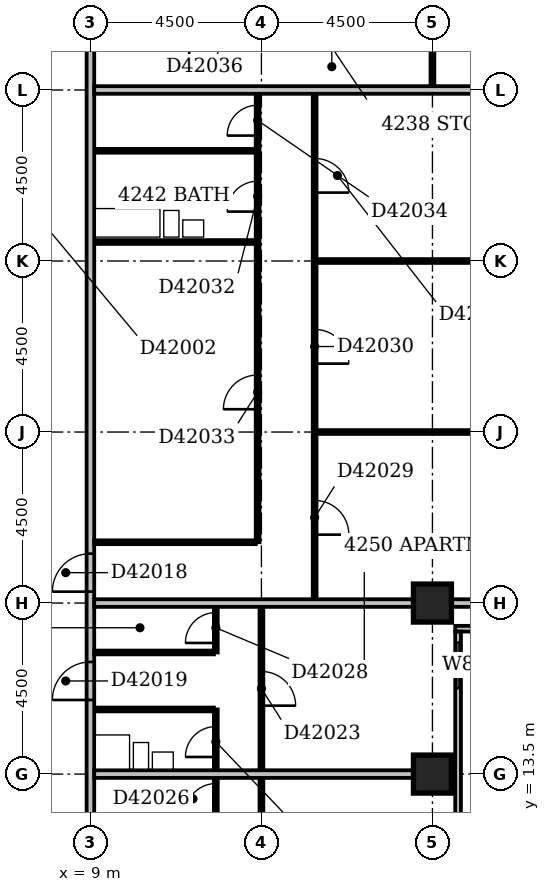
"""IFC4 building model, lengths in metres.
Left out: names, types, materials, properties, quantities, classifications, styles, units other than length and angle.
Written with IfcOpenShell. Run it as: python <this file> out.ifc"""

import sys

from ifc_helpers import new_model, si_unit, direction, frame, frame_2d, origin, origin_2d, place, context, subcontext, project, spatial, rectangle, extrude, element, fill, save


model = new_model("IFC4")
c1 = context("Model", 3, precision=1e-05, world=origin(), true_north=direction((0.0, 1.0)))
c2 = subcontext(c1, "Body", "Model", "MODEL_VIEW")
j1 = project(units=[si_unit("LENGTHUNIT", "METRE"), si_unit("PLANEANGLEUNIT", "RADIAN")], contexts=[c1])
p1 = place(None, origin())
s1 = spatial("IfcSite", under=j1, at=p1, CompositionType="ELEMENT")
p2 = place(p1, origin())
s2 = spatial("IfcBuilding", under=s1, at=p2, CompositionType="ELEMENT")
p3 = place(p2, frame((0.0, 0.0, 166.4)))
s3 = spatial("IfcBuildingStorey", under=s2, at=p3, CompositionType="ELEMENT", Elevation=166.4)
for number, where, z_axis, x_axis in (
    (1, (18.0, 13.5, -0.3), (0.0, 0.0, 1.0), (1.0, 0.0, 0.0)),
    (2, (18.0, 18.0, -0.3), (0.0, 0.0, 1.0), (1.0, 0.0, 0.0)),
):
    element("IfcColumn", number, at=place(p3, frame(where, z_axis=z_axis, x_axis=x_axis)), inside=s3, PredefinedType="COLUMN", context=c2, shape_type="SweptSolid", body=[
        extrude(rectangle(XDim=1.0, YDim=1.0, at=origin_2d()), origin(), (0.0, 0.0, 1.0), 3.6),
    ])
p4 = place(p3, frame((18.675, 8.4, 0.0), z_axis=(0.0, 0.0, 1.0), x_axis=(0.0, 1.0, 0.0)))
e3 = element("IfcWall", 3, at=p4, inside=s3, PredefinedType="STANDARD", context=c2, shape_type="SweptSolid", body=[
    extrude(rectangle(XDim=8.85, YDim=0.15, at=frame_2d((4.425, 0.0))), origin(), (0.0, 0.0, 1.0), 2.7),
])
p5 = place(p4, frame((1.65, 0.0, 0.6)))
e4 = element("IfcOpeningElement", 4, at=p5, cuts=e3, PredefinedType="OPENING", context=c2, shape_type="SweptSolid", body=[
    extrude(rectangle(XDim=2.4, YDim=1.8, at=frame_2d((1.2, 0.9))), frame((0.0, 0.087, 0.0), z_axis=(0.0, -1.0, 0.0), x_axis=(1.0, 0.0, 0.0)), (0.0, 0.0, 1.0), 0.174),
])
p6 = place(p4, frame((7.36, 0.0, 0.6)))
e5 = element("IfcOpeningElement", 5, at=p6, cuts=e3, PredefinedType="OPENING", context=c2, shape_type="SweptSolid", body=[
    extrude(rectangle(XDim=1.2, YDim=1.8, at=frame_2d((0.6, 0.9))), frame((0.0, 0.087, 0.0), z_axis=(0.0, -1.0, 0.0), x_axis=(1.0, 0.0, 0.0)), (0.0, 0.0, 1.0), 0.174),
])
p7 = place(p3, frame((18.6, 17.325, 0.0), z_axis=(0.0, 0.0, 1.0), x_axis=(1.0, 0.0, 0.0)))
e6 = element("IfcWall", 6, at=p7, inside=s3, PredefinedType="STANDARD", context=c2, shape_type="SweptSolid", body=[
    extrude(rectangle(XDim=4.65, YDim=0.15, at=frame_2d((2.325, 0.0))), origin(), (0.0, 0.0, 1.0), 2.7),
])
p8 = place(p7, frame((0.45, 0.0, 0.6)))
e7 = element("IfcOpeningElement", 7, at=p8, cuts=e6, PredefinedType="OPENING", context=c2, shape_type="SweptSolid", body=[
    extrude(rectangle(XDim=2.4, YDim=1.8, at=frame_2d((1.2, 0.9))), frame((0.0, 0.087, 0.0), z_axis=(0.0, -1.0, 0.0), x_axis=(1.0, 0.0, 0.0)), (0.0, 0.0, 1.0), 0.174),
])
p9 = place(p3, frame((9.0, 5.0, 0.0), z_axis=(0.0, 0.0, 1.0), x_axis=(0.0, 1.0, 0.0)))
e8 = element("IfcWall", 8, at=p9, inside=s3, PredefinedType="PARTITIONING", context=c2, shape_type="SweptSolid", body=[
    extrude(rectangle(XDim=27.75, YDim=0.2, at=frame_2d((13.875, 0.0))), origin(), (0.0, 0.0, 1.0), 3.3),
])
p10 = place(p9, frame((13.3, 0.0, 0.0)))
e9 = element("IfcOpeningElement", 9, at=p10, cuts=e8, PredefinedType="OPENING", context=c2, shape_type="SweptSolid", body=[
    extrude(rectangle(XDim=1.0, YDim=2.1, at=frame_2d((0.5, 1.05))), frame((0.0, 0.112, 0.0), z_axis=(0.0, -1.0, 0.0), x_axis=(1.0, 0.0, 0.0)), (0.0, 0.0, 1.0), 0.224),
])
p11 = place(p9, frame((10.45, 0.0, 0.0)))
e10 = element("IfcOpeningElement", 10, at=p11, cuts=e8, PredefinedType="OPENING", context=c2, shape_type="SweptSolid", body=[
    extrude(rectangle(XDim=1.0, YDim=2.1, at=frame_2d((0.5, 1.05))), frame((0.0, 0.112, 0.0), z_axis=(0.0, -1.0, 0.0), x_axis=(1.0, 0.0, 0.0)), (0.0, 0.0, 1.0), 0.224),
])
p12 = place(p9, frame((5.95, 0.0, 0.0)))
e11 = element("IfcOpeningElement", 11, at=p12, cuts=e8, PredefinedType="OPENING", context=c2, shape_type="SweptSolid", body=[
    extrude(rectangle(XDim=1.0, YDim=2.1, at=frame_2d((0.5, 1.05))), frame((0.0, 0.112, 0.0), z_axis=(0.0, -1.0, 0.0), x_axis=(1.0, 0.0, 0.0)), (0.0, 0.0, 1.0), 0.224),
])
p13 = place(p9, frame((1.5, 0.0, 0.0)))
e12 = element("IfcOpeningElement", 12, at=p13, cuts=e8, PredefinedType="OPENING", context=c2, shape_type="SweptSolid", body=[
    extrude(rectangle(XDim=0.9, YDim=2.1, at=frame_2d((0.45, 1.05))), frame((0.0, 0.112, 0.0), z_axis=(0.0, -1.0, 0.0), x_axis=(1.0, 0.0, 0.0)), (0.0, 0.0, 1.0), 0.224),
])
p14 = place(p3, frame((13.5, 9.5, 0.0), z_axis=(0.0, 0.0, 1.0), x_axis=(0.0, 1.0, 0.0)))
e13 = element("IfcWall", 13, at=p14, inside=s3, PredefinedType="PARTITIONING", context=c2, shape_type="SweptSolid", body=[
    extrude(rectangle(XDim=8.4, YDim=0.1, at=frame_2d((4.2, 0.0))), origin(), (0.0, 0.0, 1.0), 3.3),
])
p15 = place(p14, frame((5.8, 0.0, 0.0)))
e14 = element("IfcOpeningElement", 14, at=p15, cuts=e13, PredefinedType="OPENING", context=c2, shape_type="SweptSolid", body=[
    extrude(rectangle(XDim=0.9, YDim=2.1, at=frame_2d((0.45, 1.05))), frame((0.0, 0.062, 0.0), z_axis=(0.0, -1.0, 0.0), x_axis=(1.0, 0.0, 0.0)), (0.0, 0.0, 1.0), 0.124),
])
p16 = place(p14, frame((1.3, 0.0, 0.0)))
e15 = element("IfcOpeningElement", 15, at=p16, cuts=e13, PredefinedType="OPENING", context=c2, shape_type="SweptSolid", body=[
    extrude(rectangle(XDim=0.9, YDim=2.1, at=frame_2d((0.45, 1.05))), frame((0.0, 0.062, 0.0), z_axis=(0.0, -1.0, 0.0), x_axis=(1.0, 0.0, 0.0)), (0.0, 0.0, 1.0), 0.124),
])
p17 = place(p3, frame((12.3, 12.2, 0.0), z_axis=(0.0, 0.0, 1.0), x_axis=(0.0, 1.0, 0.0)))
e16 = element("IfcWall", 16, at=p17, inside=s3, PredefinedType="PARTITIONING", context=c2, shape_type="SweptSolid", body=[
    extrude(rectangle(XDim=3.0, YDim=0.1, at=frame_2d((1.5, 0.0))), origin(), (0.0, 0.0, 1.0), 3.3),
])
p18 = place(p17, frame((1.75, 0.0, 0.0)))
e17 = element("IfcOpeningElement", 17, at=p18, cuts=e16, PredefinedType="OPENING", context=c2, shape_type="SweptSolid", body=[
    extrude(rectangle(XDim=0.8, YDim=2.1, at=frame_2d((0.4, 1.05))), frame((0.0, 0.062, 0.0), z_axis=(0.0, -1.0, 0.0), x_axis=(1.0, 0.0, 0.0)), (0.0, 0.0, 1.0), 0.124),
])
p19 = place(p17, frame((0.25, 0.0, 0.0)))
e18 = element("IfcOpeningElement", 18, at=p19, cuts=e16, PredefinedType="OPENING", context=c2, shape_type="SweptSolid", body=[
    extrude(rectangle(XDim=0.8, YDim=2.1, at=frame_2d((0.4, 1.05))), frame((0.0, 0.062, 0.0), z_axis=(0.0, -1.0, 0.0), x_axis=(1.0, 0.0, 0.0)), (0.0, 0.0, 1.0), 0.124),
])
p20 = place(p3, frame((9.1, 13.5, 0.0), z_axis=(0.0, 0.0, 1.0), x_axis=(1.0, 0.0, 0.0)))
e19 = element("IfcWall", 19, at=p20, inside=s3, PredefinedType="PARTITIONING", context=c2, shape_type="SweptSolid", body=[
    extrude(rectangle(XDim=8.4, YDim=0.2, at=frame_2d((4.2, 0.0))), origin(), (0.0, 0.0, 1.0), 3.3),
])
p21 = place(p3, frame((9.1, 15.2, 0.0), z_axis=(0.0, 0.0, 1.0), x_axis=(1.0, 0.0, 0.0)))
e20 = element("IfcWall", 20, at=p21, inside=s3, PredefinedType="PLUMBINGWALL", context=c2, shape_type="SweptSolid", body=[
    extrude(rectangle(XDim=3.15, YDim=0.1, at=frame_2d((1.575, 0.0))), origin(), (0.0, 0.0, 1.0), 3.3),
])
p22 = place(p3, frame((9.1, 16.7, 0.0), z_axis=(0.0, 0.0, 1.0), x_axis=(1.0, 0.0, 0.0)))
e21 = element("IfcWall", 21, at=p22, inside=s3, PredefinedType="PARTITIONING", context=c2, shape_type="SweptSolid", body=[
    extrude(rectangle(XDim=3.15, YDim=0.1, at=frame_2d((1.575, 0.0))), origin(), (0.0, 0.0, 1.0), 3.3),
])
p23 = place(p3, frame((12.3, 16.7, 0.0), z_axis=(0.0, 0.0, 1.0), x_axis=(0.0, 1.0, 0.0)))
e22 = element("IfcWall", 22, at=p23, inside=s3, PredefinedType="PARTITIONING", context=c2, shape_type="SweptSolid", body=[
    extrude(rectangle(XDim=1.2, YDim=0.1, at=frame_2d((0.6, 0.0))), origin(), (0.0, 0.0, 1.0), 3.3),
])
p24 = place(p23, frame((0.25, 0.0, 0.0)))
e23 = element("IfcOpeningElement", 23, at=p24, cuts=e22, PredefinedType="OPENING", context=c2, shape_type="SweptSolid", body=[
    extrude(rectangle(XDim=0.8, YDim=2.1, at=frame_2d((0.4, 1.05))), frame((0.0, 0.062, 0.0), z_axis=(0.0, -1.0, 0.0), x_axis=(1.0, 0.0, 0.0)), (0.0, 0.0, 1.0), 0.124),
])
p25 = place(p3, frame((9.1, 18.0, 0.0), z_axis=(0.0, 0.0, 1.0), x_axis=(1.0, 0.0, 0.0)))
e24 = element("IfcWall", 24, at=p25, inside=s3, PredefinedType="PARTITIONING", context=c2, shape_type="SweptSolid", body=[
    extrude(rectangle(XDim=8.4, YDim=0.2, at=frame_2d((4.2, 0.0))), origin(), (0.0, 0.0, 1.0), 2.6),
])
p26 = place(p3, frame((18.5, 18.0, 0.0), z_axis=(0.0, 0.0, 1.0), x_axis=(1.0, 0.0, 0.0)))
e25 = element("IfcWall", 25, at=p26, inside=s3, PredefinedType="PARTITIONING", context=c2, shape_type="SweptSolid", body=[
    extrude(rectangle(XDim=3.5, YDim=0.2, at=frame_2d((1.75, 0.0))), origin(), (0.0, 0.0, 1.0), 2.7),
])
p27 = place(p3, frame((14.9, 18.1, 0.0), z_axis=(0.0, 0.0, 1.0), x_axis=(0.0, 1.0, 0.0)))
e26 = element("IfcWall", 26, at=p27, inside=s3, PredefinedType="PARTITIONING", context=c2, shape_type="SweptSolid", body=[
    extrude(rectangle(XDim=13.3, YDim=0.1, at=frame_2d((6.65, 0.0))), origin(), (0.0, 0.0, 1.0), 3.3),
])
p28 = place(p27, frame((1.7, 0.0, 0.0)))
e27 = element("IfcOpeningElement", 27, at=p28, cuts=e26, PredefinedType="OPENING", context=c2, shape_type="SweptSolid", body=[
    extrude(rectangle(XDim=0.9, YDim=2.1, at=frame_2d((0.45, 1.05))), frame((0.0, 0.062, 0.0), z_axis=(0.0, -1.0, 0.0), x_axis=(1.0, 0.0, 0.0)), (0.0, 0.0, 1.0), 0.124),
])
p29 = place(p27, frame((6.2, 0.0, 0.0)))
e28 = element("IfcOpeningElement", 28, at=p29, cuts=e26, PredefinedType="OPENING", context=c2, shape_type="SweptSolid", body=[
    extrude(rectangle(XDim=0.9, YDim=2.1, at=frame_2d((0.45, 1.05))), frame((0.0, 0.062, 0.0), z_axis=(0.0, -1.0, 0.0), x_axis=(1.0, 0.0, 0.0)), (0.0, 0.0, 1.0), 0.124),
])
p30 = place(p27, frame((10.7, 0.0, 0.0)))
e29 = element("IfcOpeningElement", 29, at=p30, cuts=e26, PredefinedType="OPENING", context=c2, shape_type="SweptSolid", body=[
    extrude(rectangle(XDim=0.9, YDim=2.1, at=frame_2d((0.45, 1.05))), frame((0.0, 0.062, 0.0), z_axis=(0.0, -1.0, 0.0), x_axis=(1.0, 0.0, 0.0)), (0.0, 0.0, 1.0), 0.124),
])
p31 = place(p3, frame((9.1, 19.6, 0.0), z_axis=(0.0, 0.0, 1.0), x_axis=(1.0, 0.0, 0.0)))
e30 = element("IfcWall", 30, at=p31, inside=s3, PredefinedType="PARTITIONING", context=c2, shape_type="SweptSolid", body=[
    extrude(rectangle(XDim=4.25, YDim=0.1, at=frame_2d((2.125, 0.0))), origin(), (0.0, 0.0, 1.0), 3.3),
])
p32 = place(p3, frame((13.4, 19.6, 0.0), z_axis=(0.0, 0.0, 1.0), x_axis=(0.0, 1.0, 0.0)))
e31 = element("IfcWall", 31, at=p32, inside=s3, PredefinedType="PARTITIONING", context=c2, shape_type="SweptSolid", body=[
    extrude(rectangle(XDim=11.8, YDim=0.1, at=frame_2d((5.9, 0.0))), origin(), (0.0, 0.0, 1.0), 3.3),
])
p33 = place(p32, frame((8.7, 0.0, 0.0)))
e32 = element("IfcOpeningElement", 32, at=p33, cuts=e31, PredefinedType="OPENING", context=c2, shape_type="SweptSolid", body=[
    extrude(rectangle(XDim=0.8, YDim=2.1, at=frame_2d((0.4, 1.05))), frame((0.0, 0.062, 0.0), z_axis=(0.0, -1.0, 0.0), x_axis=(1.0, 0.0, 0.0)), (0.0, 0.0, 1.0), 0.124),
])
p34 = place(p32, frame((3.5, 0.0, 0.0)))
e33 = element("IfcOpeningElement", 33, at=p34, cuts=e31, PredefinedType="OPENING", context=c2, shape_type="SweptSolid", body=[
    extrude(rectangle(XDim=0.9, YDim=2.1, at=frame_2d((0.45, 1.05))), frame((0.0, 0.062, 0.0), z_axis=(0.0, -1.0, 0.0), x_axis=(1.0, 0.0, 0.0)), (0.0, 0.0, 1.0), 0.124),
])
p35 = place(p32, frame((10.7, 0.0, 0.0)))
e34 = element("IfcOpeningElement", 34, at=p35, cuts=e31, PredefinedType="OPENING", context=c2, shape_type="SweptSolid", body=[
    extrude(rectangle(XDim=0.8, YDim=2.1, at=frame_2d((0.4, 1.05))), frame((0.0, 0.062, 0.0), z_axis=(0.0, -1.0, 0.0), x_axis=(1.0, 0.0, 0.0)), (0.0, 0.0, 1.0), 0.124),
])
p36 = place(p3, frame((14.95, 22.5, 0.0), z_axis=(0.0, 0.0, 1.0), x_axis=(1.0, 0.0, 0.0)))
e35 = element("IfcWall", 35, at=p36, inside=s3, PredefinedType="PARTITIONING", context=c2, shape_type="SweptSolid", body=[
    extrude(rectangle(XDim=7.05, YDim=0.1, at=frame_2d((3.525, 0.0))), origin(), (0.0, 0.0, 1.0), 3.3),
])
p37 = place(p3, frame((14.95, 27.0, 0.0), z_axis=(0.0, 0.0, 1.0), x_axis=(1.0, 0.0, 0.0)))
e36 = element("IfcWall", 36, at=p37, inside=s3, PredefinedType="PARTITIONING", context=c2, shape_type="SweptSolid", body=[
    extrude(rectangle(XDim=7.05, YDim=0.1, at=frame_2d((3.525, 0.0))), origin(), (0.0, 0.0, 1.0), 2.7),
])
p38 = place(p3, frame((9.1, 27.5, 0.0), z_axis=(0.0, 0.0, 1.0), x_axis=(1.0, 0.0, 0.0)))
e37 = element("IfcWall", 37, at=p38, inside=s3, PredefinedType="PLUMBINGWALL", context=c2, shape_type="SweptSolid", body=[
    extrude(rectangle(XDim=4.25, YDim=0.1, at=frame_2d((2.125, 0.0))), origin(), (0.0, 0.0, 1.0), 2.7),
])
p39 = place(p3, frame((9.1, 29.9, 0.0), z_axis=(0.0, 0.0, 1.0), x_axis=(1.0, 0.0, 0.0)))
e38 = element("IfcWall", 38, at=p39, inside=s3, PredefinedType="PLUMBINGWALL", context=c2, shape_type="SweptSolid", body=[
    extrude(rectangle(XDim=4.25, YDim=0.1, at=frame_2d((2.125, 0.0))), origin(), (0.0, 0.0, 1.0), 3.3),
])
p40 = place(p3, frame((9.1, 31.5, 0.0), z_axis=(0.0, 0.0, 1.0), x_axis=(1.0, 0.0, 0.0)))
e39 = element("IfcWall", 39, at=p40, inside=s3, PredefinedType="PARTITIONING", context=c2, shape_type="SweptSolid", body=[
    extrude(rectangle(XDim=12.9, YDim=0.2, at=frame_2d((6.45, 0.0))), origin(), (0.0, 0.0, 1.0), 3.3),
])
p41 = place(p3, frame((18.0, 31.6, 0.0), z_axis=(0.0, 0.0, 1.0), x_axis=(0.0, 1.0, 0.0)))
e40 = element("IfcWall", 40, at=p41, inside=s3, PredefinedType="PARTITIONING", context=c2, shape_type="SweptSolid", body=[
    extrude(rectangle(XDim=4.3, YDim=0.1, at=frame_2d((2.15, 0.0))), origin(), (0.0, 0.0, 1.0), 3.3),
])
p42 = place(p41, frame((1.7, 0.0, 0.0)))
e41 = element("IfcOpeningElement", 41, at=p42, cuts=e40, PredefinedType="OPENING", context=c2, shape_type="SweptSolid", body=[
    extrude(rectangle(XDim=0.9, YDim=2.1, at=frame_2d((0.45, 1.05))), frame((0.0, 0.062, 0.0), z_axis=(0.0, -1.0, 0.0), x_axis=(1.0, 0.0, 0.0)), (0.0, 0.0, 1.0), 0.124),
])
p43 = place(p6, origin())
e42 = element("IfcWindow", 42, at=p43, inside=s3, PartitioningType="SINGLE_PANEL", PredefinedType="WINDOW", context=c2, shape_type="SweptSolid", body=[
    extrude(rectangle(XDim=1.2, YDim=1.8, at=frame_2d((0.6, 0.9))), frame((0.0, 0.03, 0.0), z_axis=(0.0, -1.0, 0.0), x_axis=(1.0, 0.0, 0.0)), (0.0, 0.0, 1.0), 0.06),
])
fill(e5, e42)
p44 = place(p10, origin())
e43 = element("IfcDoor", 43, at=p44, inside=s3, OperationType="SINGLE_SWING_LEFT", PredefinedType="DOOR", context=c2, shape_type="SweptSolid", body=[
    extrude(rectangle(XDim=1.0, YDim=2.1, at=frame_2d((0.5, 1.05))), frame((0.0, 0.025, 0.0), z_axis=(0.0, -1.0, 0.0), x_axis=(1.0, 0.0, 0.0)), (0.0, 0.0, 1.0), 0.05),
])
fill(e9, e43)
p45 = place(p11, origin())
e44 = element("IfcDoor", 44, at=p45, inside=s3, OperationType="SINGLE_SWING_LEFT", PredefinedType="DOOR", context=c2, shape_type="SweptSolid", body=[
    extrude(rectangle(XDim=1.0, YDim=2.1, at=frame_2d((0.5, 1.05))), frame((0.0, 0.025, 0.0), z_axis=(0.0, -1.0, 0.0), x_axis=(1.0, 0.0, 0.0)), (0.0, 0.0, 1.0), 0.05),
])
fill(e10, e44)
p46 = place(p15, frame((0.9, 0.0, 0.0), z_axis=(0.0, 0.0, 1.0), x_axis=(-1.0, 0.0, 0.0)))
e45 = element("IfcDoor", 45, at=p46, inside=s3, OperationType="SINGLE_SWING_RIGHT", PredefinedType="DOOR", context=c2, shape_type="SweptSolid", body=[
    extrude(rectangle(XDim=0.9, YDim=2.1, at=frame_2d((0.45, 1.05))), frame((0.0, 0.025, 0.0), z_axis=(0.0, -1.0, 0.0), x_axis=(1.0, 0.0, 0.0)), (0.0, 0.0, 1.0), 0.05),
])
fill(e14, e45)
p47 = place(p18, origin())
e46 = element("IfcDoor", 46, at=p47, inside=s3, OperationType="SINGLE_SWING_LEFT", PredefinedType="DOOR", context=c2, shape_type="SweptSolid", body=[
    extrude(rectangle(XDim=0.8, YDim=2.1, at=frame_2d((0.4, 1.05))), frame((0.0, 0.025, 0.0), z_axis=(0.0, -1.0, 0.0), x_axis=(1.0, 0.0, 0.0)), (0.0, 0.0, 1.0), 0.05),
])
fill(e17, e46)
p48 = place(p19, origin())
e47 = element("IfcDoor", 47, at=p48, inside=s3, OperationType="SINGLE_SWING_LEFT", PredefinedType="DOOR", context=c2, shape_type="SweptSolid", body=[
    extrude(rectangle(XDim=0.8, YDim=2.1, at=frame_2d((0.4, 1.05))), frame((0.0, 0.025, 0.0), z_axis=(0.0, -1.0, 0.0), x_axis=(1.0, 0.0, 0.0)), (0.0, 0.0, 1.0), 0.05),
])
fill(e18, e47)
p49 = place(p24, origin())
e48 = element("IfcDoor", 48, at=p49, inside=s3, OperationType="SINGLE_SWING_LEFT", PredefinedType="DOOR", context=c2, shape_type="SweptSolid", body=[
    extrude(rectangle(XDim=0.8, YDim=2.1, at=frame_2d((0.4, 1.05))), frame((0.0, 0.025, 0.0), z_axis=(0.0, -1.0, 0.0), x_axis=(1.0, 0.0, 0.0)), (0.0, 0.0, 1.0), 0.05),
])
fill(e23, e48)
p50 = place(p28, frame((0.9, 0.0, 0.0), z_axis=(0.0, 0.0, 1.0), x_axis=(-1.0, 0.0, 0.0)))
e49 = element("IfcDoor", 49, at=p50, inside=s3, OperationType="SINGLE_SWING_RIGHT", PredefinedType="DOOR", context=c2, shape_type="SweptSolid", body=[
    extrude(rectangle(XDim=0.9, YDim=2.1, at=frame_2d((0.45, 1.05))), frame((0.0, 0.025, 0.0), z_axis=(0.0, -1.0, 0.0), x_axis=(1.0, 0.0, 0.0)), (0.0, 0.0, 1.0), 0.05),
])
fill(e27, e49)
p51 = place(p29, frame((0.9, 0.0, 0.0), z_axis=(0.0, 0.0, 1.0), x_axis=(-1.0, 0.0, 0.0)))
e50 = element("IfcDoor", 50, at=p51, inside=s3, OperationType="SINGLE_SWING_RIGHT", PredefinedType="DOOR", context=c2, shape_type="SweptSolid", body=[
    extrude(rectangle(XDim=0.9, YDim=2.1, at=frame_2d((0.45, 1.05))), frame((0.0, 0.025, 0.0), z_axis=(0.0, -1.0, 0.0), x_axis=(1.0, 0.0, 0.0)), (0.0, 0.0, 1.0), 0.05),
])
fill(e28, e50)
p52 = place(p30, frame((0.9, 0.0, 0.0), z_axis=(0.0, 0.0, 1.0), x_axis=(-1.0, 0.0, 0.0)))
e51 = element("IfcDoor", 51, at=p52, inside=s3, OperationType="SINGLE_SWING_RIGHT", PredefinedType="DOOR", context=c2, shape_type="SweptSolid", body=[
    extrude(rectangle(XDim=0.9, YDim=2.1, at=frame_2d((0.45, 1.05))), frame((0.0, 0.025, 0.0), z_axis=(0.0, -1.0, 0.0), x_axis=(1.0, 0.0, 0.0)), (0.0, 0.0, 1.0), 0.05),
])
fill(e29, e51)
p53 = place(p33, origin())
e52 = element("IfcDoor", 52, at=p53, inside=s3, OperationType="SINGLE_SWING_LEFT", PredefinedType="DOOR", context=c2, shape_type="SweptSolid", body=[
    extrude(rectangle(XDim=0.8, YDim=2.1, at=frame_2d((0.4, 1.05))), frame((0.0, 0.025, 0.0), z_axis=(0.0, -1.0, 0.0), x_axis=(1.0, 0.0, 0.0)), (0.0, 0.0, 1.0), 0.05),
])
fill(e32, e52)
p54 = place(p34, origin())
e53 = element("IfcDoor", 53, at=p54, inside=s3, OperationType="SINGLE_SWING_LEFT", PredefinedType="DOOR", context=c2, shape_type="SweptSolid", body=[
    extrude(rectangle(XDim=0.9, YDim=2.1, at=frame_2d((0.45, 1.05))), frame((0.0, 0.025, 0.0), z_axis=(0.0, -1.0, 0.0), x_axis=(1.0, 0.0, 0.0)), (0.0, 0.0, 1.0), 0.05),
])
fill(e33, e53)
p55 = place(p35, origin())
e54 = element("IfcDoor", 54, at=p55, inside=s3, OperationType="SINGLE_SWING_LEFT", PredefinedType="DOOR", context=c2, shape_type="SweptSolid", body=[
    extrude(rectangle(XDim=0.8, YDim=2.1, at=frame_2d((0.4, 1.05))), frame((0.0, 0.025, 0.0), z_axis=(0.0, -1.0, 0.0), x_axis=(1.0, 0.0, 0.0)), (0.0, 0.0, 1.0), 0.05),
])
fill(e34, e54)
save(model, sys.argv[1])
